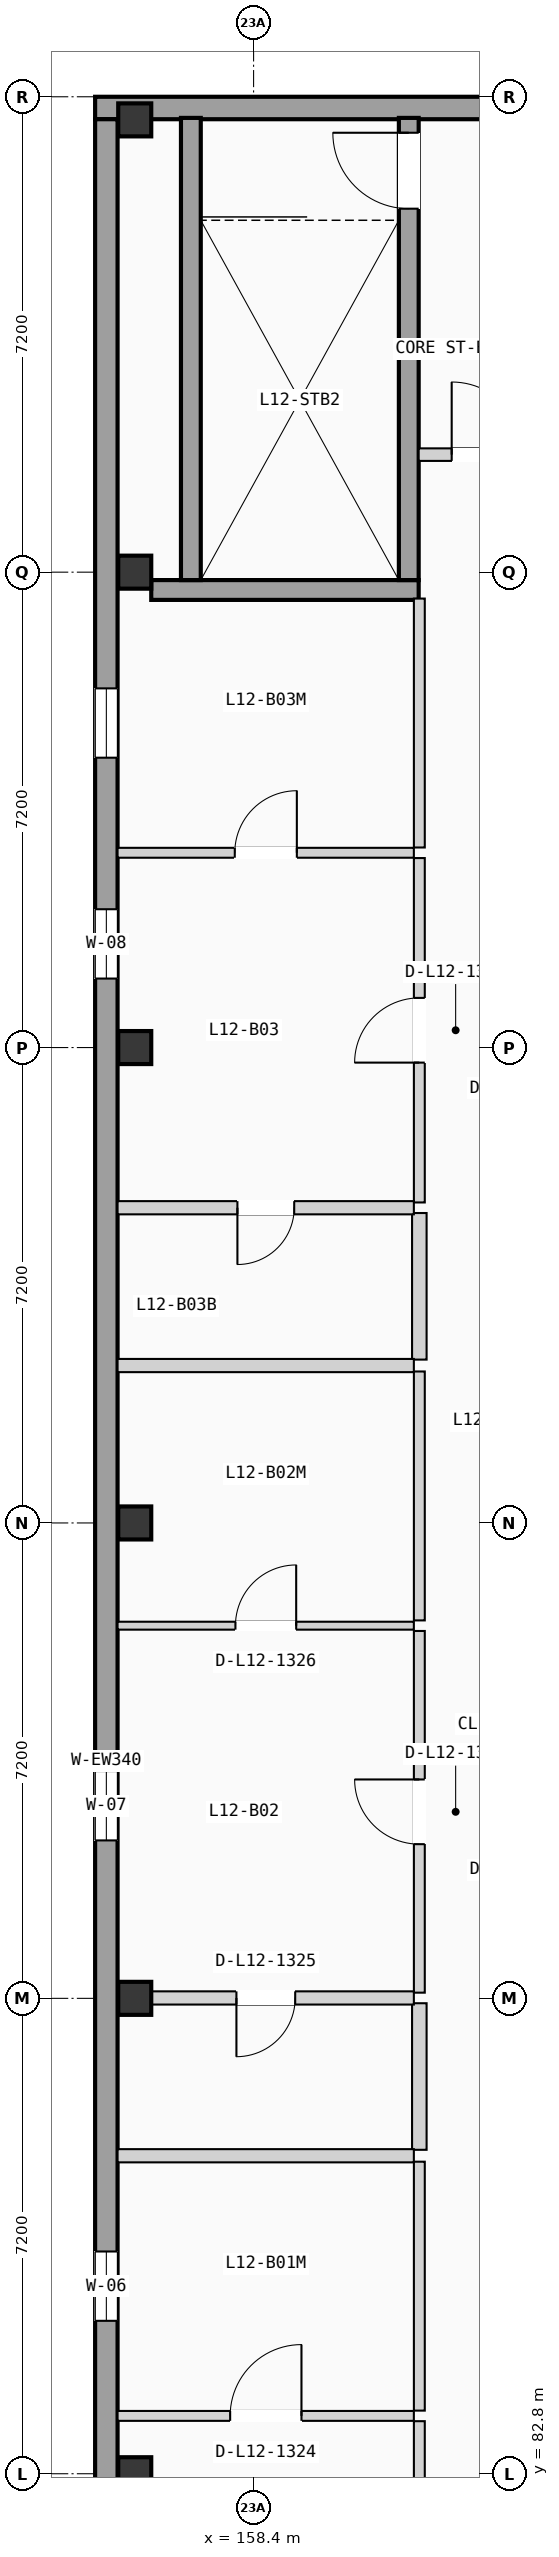
"""IFC4 building model, lengths in metres.
Left out: names, types, materials, properties, quantities, classifications, styles, units other than length and angle.
Written with IfcOpenShell. Run it as: python <this file> out.ifc"""

import sys

from ifc_helpers import new_model, si_unit, direction, frame, frame_2d, origin, origin_2d, place, context, subcontext, project, spatial, rectangle, extrude, element, fill, save


model = new_model("IFC4")
c1 = context("Model", 3, precision=1e-05, world=origin(), true_north=direction((0.0, 1.0)))
c2 = subcontext(c1, "Body", "Model", "MODEL_VIEW")
j1 = project(units=[si_unit("LENGTHUNIT", "METRE"), si_unit("PLANEANGLEUNIT", "RADIAN")], contexts=[c1])
p1 = place(None, origin())
s1 = spatial("IfcSite", under=j1, at=p1, CompositionType="ELEMENT")
p2 = place(p1, origin())
s2 = spatial("IfcBuilding", under=s1, at=p2, CompositionType="ELEMENT")
p3 = place(p2, frame((0.0, 0.0, 40.425)))
s3 = spatial("IfcBuildingStorey", under=s2, at=p3, CompositionType="ELEMENT", Elevation=40.425)
for number, where, z_axis, x_axis in (
    (1, (156.6, 82.8, 0.0), (0.0, 0.0, 1.0), (1.0, 0.0, 0.0)),
    (2, (156.6, 90.0, 0.0), (0.0, 0.0, 1.0), (1.0, 0.0, 0.0)),
    (3, (156.6, 97.2, 0.0), (0.0, 0.0, 1.0), (1.0, 0.0, 0.0)),
    (4, (156.6, 104.4, 0.0), (0.0, 0.0, 1.0), (1.0, 0.0, 0.0)),
    (5, (156.6, 111.6, 0.0), (0.0, 0.0, 1.0), (1.0, 0.0, 0.0)),
    (6, (156.6, 118.45, 0.0), (0.0, 0.0, 1.0), (1.0, 0.0, 0.0)),
):
    element("IfcColumn", number, at=place(p3, frame(where, z_axis=z_axis, x_axis=x_axis)), inside=s3, PredefinedType="COLUMN", context=c2, shape_type="SweptSolid", body=[
        extrude(rectangle(XDim=0.5, YDim=0.5, at=origin_2d()), origin(), (0.0, 0.0, 1.0), 2.85),
    ])
p4 = place(p3, frame((156.0, 118.63, 0.0), z_axis=(0.0, 0.0, 1.0), x_axis=(1.0, 0.0, 0.0)))
e7 = element("IfcWall", 7, at=p4, inside=s3, PredefinedType="SOLIDWALL", context=c2, shape_type="SweptSolid", body=[
    extrude(rectangle(XDim=12.0, YDim=0.34, at=frame_2d((6.0, 0.0))), origin(), (0.0, 0.0, 1.0), 2.55),
])
p5 = place(p3, frame((156.17, 68.74, 0.0), z_axis=(0.0, 0.0, 1.0), x_axis=(0.0, 1.0, 0.0)))
e8 = element("IfcWall", 8, at=p5, inside=s3, PredefinedType="SOLIDWALL", context=c2, shape_type="SweptSolid", body=[
    extrude(rectangle(XDim=49.72, YDim=0.34, at=frame_2d((24.86, 0.0))), origin(), (0.0, 0.0, 1.0), 2.55),
])
p6 = place(p5, frame((11.24, 0.0, 0.85)))
e9 = element("IfcOpeningElement", 9, at=p6, cuts=e8, PredefinedType="OPENING", context=c2, shape_type="SweptSolid", body=[
    extrude(rectangle(XDim=0.95, YDim=1.2, at=frame_2d((0.475, 0.6))), frame((0.0, 0.18, 0.0), z_axis=(0.0, -1.0, 0.0), x_axis=(1.0, 0.0, 0.0)), (0.0, 0.0, 1.0), 0.36),
])
p7 = place(p5, frame((16.376, 0.0, 0.75)))
e10 = element("IfcOpeningElement", 10, at=p7, cuts=e8, PredefinedType="OPENING", context=c2, shape_type="SweptSolid", body=[
    extrude(rectangle(XDim=1.05, YDim=1.2, at=frame_2d((0.525, 0.6))), frame((0.0, 0.18, 0.0), z_axis=(0.0, -1.0, 0.0), x_axis=(1.0, 0.0, 0.0)), (0.0, 0.0, 1.0), 0.36),
])
p8 = place(p5, frame((23.652, 0.0, 0.75)))
e11 = element("IfcOpeningElement", 11, at=p8, cuts=e8, PredefinedType="OPENING", context=c2, shape_type="SweptSolid", body=[
    extrude(rectangle(XDim=1.05, YDim=1.35, at=frame_2d((0.525, 0.675))), frame((0.0, 0.18, 0.0), z_axis=(0.0, -1.0, 0.0), x_axis=(1.0, 0.0, 0.0)), (0.0, 0.0, 1.0), 0.36),
])
p9 = place(p5, frame((36.705, 0.0, 0.665)))
e12 = element("IfcOpeningElement", 12, at=p9, cuts=e8, PredefinedType="OPENING", context=c2, shape_type="SweptSolid", body=[
    extrude(rectangle(XDim=1.05, YDim=1.5, at=frame_2d((0.525, 0.75))), frame((0.0, 0.18, 0.0), z_axis=(0.0, -1.0, 0.0), x_axis=(1.0, 0.0, 0.0)), (0.0, 0.0, 1.0), 0.36),
])
p10 = place(p5, frame((40.05, 0.0, 0.515)))
e13 = element("IfcOpeningElement", 13, at=p10, cuts=e8, PredefinedType="OPENING", context=c2, shape_type="SweptSolid", body=[
    extrude(rectangle(XDim=1.05, YDim=1.65, at=frame_2d((0.525, 0.825))), frame((0.0, 0.18, 0.0), z_axis=(0.0, -1.0, 0.0), x_axis=(1.0, 0.0, 0.0)), (0.0, 0.0, 1.0), 0.36),
])
p11 = place(p3, frame((156.85, 111.33, 0.0), z_axis=(0.0, 0.0, 1.0), x_axis=(1.0, 0.0, 0.0)))
e14 = element("IfcWall", 14, at=p11, inside=s3, PredefinedType="SHEAR", context=c2, shape_type="SweptSolid", body=[
    extrude(rectangle(XDim=4.05, YDim=0.3, at=frame_2d((2.025, 0.0))), origin(), (0.0, 0.0, 1.0), 2.55),
])
p12 = place(p3, frame((157.45, 111.48, 0.0), z_axis=(0.0, 0.0, 1.0), x_axis=(0.0, 1.0, 0.0)))
e15 = element("IfcWall", 15, at=p12, inside=s3, PredefinedType="SHEAR", context=c2, shape_type="SweptSolid", body=[
    extrude(rectangle(XDim=7.0, YDim=0.3, at=frame_2d((3.5, 0.0))), origin(), (0.0, 0.0, 1.0), 2.55),
])
p13 = place(p3, frame((160.75, 111.48, 0.0), z_axis=(0.0, 0.0, 1.0), x_axis=(0.0, 1.0, 0.0)))
e16 = element("IfcWall", 16, at=p13, inside=s3, PredefinedType="SHEAR", context=c2, shape_type="SweptSolid", body=[
    extrude(rectangle(XDim=7.0, YDim=0.3, at=frame_2d((3.5, 0.0))), origin(), (0.0, 0.0, 1.0), 2.55),
])
p14 = place(p13, frame((5.625, 0.0, 0.0)))
e17 = element("IfcOpeningElement", 17, at=p14, cuts=e16, PredefinedType="OPENING", context=c2, shape_type="SweptSolid", body=[
    extrude(rectangle(XDim=1.15, YDim=2.12, at=frame_2d((0.575, 1.06))), frame((0.0, 0.16, 0.0), z_axis=(0.0, -1.0, 0.0), x_axis=(1.0, 0.0, 0.0)), (0.0, 0.0, 1.0), 0.32),
])
p15 = place(p3, frame((160.9, 113.38, 0.0), z_axis=(0.0, 0.0, 1.0), x_axis=(1.0, 0.0, 0.0)))
e18 = element("IfcWall", 18, at=p15, inside=s3, PredefinedType="PARTITIONING", context=c2, shape_type="SweptSolid", body=[
    extrude(rectangle(XDim=2.0, YDim=0.19, at=frame_2d((1.0, 0.0))), origin(), (0.0, 0.0, 1.0), 2.39),
])
p16 = place(p15, frame((0.5, 0.0, 0.0)))
e19 = element("IfcOpeningElement", 19, at=p16, cuts=e18, PredefinedType="OPENING", context=c2, shape_type="SweptSolid", body=[
    extrude(rectangle(XDim=1.1, YDim=2.12, at=frame_2d((0.55, 1.06))), frame((0.0, 0.105, 0.0), z_axis=(0.0, -1.0, 0.0), x_axis=(1.0, 0.0, 0.0)), (0.0, 0.0, 1.0), 0.21),
])
p17 = place(p3, frame((160.91, 78.38, 0.0), z_axis=(0.0, 0.0, 1.0), x_axis=(0.0, 1.0, 0.0)))
e20 = element("IfcWall", 20, at=p17, inside=s3, PredefinedType="PARTITIONING", context=c2, shape_type="SweptSolid", body=[
    extrude(rectangle(XDim=5.216, YDim=0.165, at=frame_2d((2.608, 0.0))), origin(), (0.0, 0.0, 1.0), 2.39),
])
p18 = place(p17, frame((2.118, 0.0, 0.0)))
e21 = element("IfcOpeningElement", 21, at=p18, cuts=e20, PredefinedType="OPENING", context=c2, shape_type="SweptSolid", body=[
    extrude(rectangle(XDim=0.98, YDim=2.08, at=frame_2d((0.49, 1.04))), frame((0.0, 0.093, 0.0), z_axis=(0.0, -1.0, 0.0), x_axis=(1.0, 0.0, 0.0)), (0.0, 0.0, 1.0), 0.185),
])
p19 = place(p3, frame((160.91, 83.756, 0.0), z_axis=(0.0, 0.0, 1.0), x_axis=(0.0, 1.0, 0.0)))
e22 = element("IfcWall", 22, at=p19, inside=s3, PredefinedType="PARTITIONING", context=c2, shape_type="SweptSolid", body=[
    extrude(rectangle(XDim=3.77, YDim=0.165, at=frame_2d((1.885, 0.0))), origin(), (0.0, 0.0, 1.0), 2.39),
])
p20 = place(p3, frame((160.91, 87.706, 0.0), z_axis=(0.0, 0.0, 1.0), x_axis=(0.0, 1.0, 0.0)))
e23 = element("IfcWall", 23, at=p20, inside=s3, PredefinedType="PLUMBINGWALL", context=c2, shape_type="SweptSolid", body=[
    extrude(rectangle(XDim=2.22, YDim=0.22, at=frame_2d((1.11, 0.0))), origin(), (0.0, 0.0, 1.0), 2.39),
])
p21 = place(p3, frame((160.91, 90.086, 0.0), z_axis=(0.0, 0.0, 1.0), x_axis=(0.0, 1.0, 0.0)))
e24 = element("IfcWall", 24, at=p21, inside=s3, PredefinedType="PARTITIONING", context=c2, shape_type="SweptSolid", body=[
    extrude(rectangle(XDim=5.478, YDim=0.165, at=frame_2d((2.739, 0.0))), origin(), (0.0, 0.0, 1.0), 2.39),
])
p22 = place(p21, frame((2.249, 0.0, 0.0)))
e25 = element("IfcOpeningElement", 25, at=p22, cuts=e24, PredefinedType="OPENING", context=c2, shape_type="SweptSolid", body=[
    extrude(rectangle(XDim=0.98, YDim=2.08, at=frame_2d((0.49, 1.04))), frame((0.0, 0.093, 0.0), z_axis=(0.0, -1.0, 0.0), x_axis=(1.0, 0.0, 0.0)), (0.0, 0.0, 1.0), 0.185),
])
p23 = place(p3, frame((160.91, 95.724, 0.0), z_axis=(0.0, 0.0, 1.0), x_axis=(0.0, 1.0, 0.0)))
e26 = element("IfcWall", 26, at=p23, inside=s3, PredefinedType="PARTITIONING", context=c2, shape_type="SweptSolid", body=[
    extrude(rectangle(XDim=3.77, YDim=0.165, at=frame_2d((1.885, 0.0))), origin(), (0.0, 0.0, 1.0), 2.39),
])
p24 = place(p3, frame((160.91, 99.674, 0.0), z_axis=(0.0, 0.0, 1.0), x_axis=(0.0, 1.0, 0.0)))
e27 = element("IfcWall", 27, at=p24, inside=s3, PredefinedType="PLUMBINGWALL", context=c2, shape_type="SweptSolid", body=[
    extrude(rectangle(XDim=2.22, YDim=0.22, at=frame_2d((1.11, 0.0))), origin(), (0.0, 0.0, 1.0), 2.39),
])
p25 = place(p3, frame((160.91, 102.054, 0.0), z_axis=(0.0, 0.0, 1.0), x_axis=(0.0, 1.0, 0.0)))
e28 = element("IfcWall", 28, at=p25, inside=s3, PredefinedType="PARTITIONING", context=c2, shape_type="SweptSolid", body=[
    extrude(rectangle(XDim=5.216, YDim=0.165, at=frame_2d((2.608, 0.0))), origin(), (0.0, 0.0, 1.0), 2.39),
])
p26 = place(p25, frame((2.118, 0.0, 0.0)))
e29 = element("IfcOpeningElement", 29, at=p26, cuts=e28, PredefinedType="OPENING", context=c2, shape_type="SweptSolid", body=[
    extrude(rectangle(XDim=0.98, YDim=2.08, at=frame_2d((0.49, 1.04))), frame((0.0, 0.093, 0.0), z_axis=(0.0, -1.0, 0.0), x_axis=(1.0, 0.0, 0.0)), (0.0, 0.0, 1.0), 0.185),
])
p27 = place(p3, frame((160.91, 107.43, 0.0), z_axis=(0.0, 0.0, 1.0), x_axis=(0.0, 1.0, 0.0)))
e30 = element("IfcWall", 30, at=p27, inside=s3, PredefinedType="PARTITIONING", context=c2, shape_type="SweptSolid", body=[
    extrude(rectangle(XDim=3.77, YDim=0.165, at=frame_2d((1.885, 0.0))), origin(), (0.0, 0.0, 1.0), 2.39),
])
p28 = place(p3, frame((156.34, 83.676, 0.0), z_axis=(0.0, 0.0, 1.0), x_axis=(1.0, 0.0, 0.0)))
e31 = element("IfcWall", 31, at=p28, inside=s3, PredefinedType="PARTITIONING", context=c2, shape_type="SweptSolid", body=[
    extrude(rectangle(XDim=4.487, YDim=0.15, at=frame_2d((2.243, 0.0))), origin(), (0.0, 0.0, 1.0), 2.39),
])
p29 = place(p28, frame((1.705, 0.0, 0.0)))
e32 = element("IfcOpeningElement", 32, at=p29, cuts=e31, PredefinedType="OPENING", context=c2, shape_type="SweptSolid", body=[
    extrude(rectangle(XDim=1.08, YDim=2.1, at=frame_2d((0.54, 1.05))), frame((0.0, 0.085, 0.0), z_axis=(0.0, -1.0, 0.0), x_axis=(1.0, 0.0, 0.0)), (0.0, 0.0, 1.0), 0.17),
])
p30 = place(p3, frame((156.34, 87.616, 0.0), z_axis=(0.0, 0.0, 1.0), x_axis=(1.0, 0.0, 0.0)))
e33 = element("IfcWall", 33, at=p30, inside=s3, PredefinedType="PLUMBINGWALL", context=c2, shape_type="SweptSolid", body=[
    extrude(rectangle(XDim=4.487, YDim=0.2, at=frame_2d((2.243, 0.0))), origin(), (0.0, 0.0, 1.0), 2.39),
])
p31 = place(p3, frame((156.34, 90.006, 0.0), z_axis=(0.0, 0.0, 1.0), x_axis=(1.0, 0.0, 0.0)))
e34 = element("IfcWall", 34, at=p31, inside=s3, PredefinedType="PLUMBINGWALL", context=c2, shape_type="SweptSolid", body=[
    extrude(rectangle(XDim=4.487, YDim=0.2, at=frame_2d((2.243, 0.0))), origin(), (0.0, 0.0, 1.0), 2.12),
])
p32 = place(p31, frame((1.8, 0.0, 0.0)))
e35 = element("IfcOpeningElement", 35, at=p32, cuts=e34, PredefinedType="OPENING", context=c2, shape_type="SweptSolid", body=[
    extrude(rectangle(XDim=0.89, YDim=2.03, at=frame_2d((0.445, 1.015))), frame((0.0, 0.11, 0.0), z_axis=(0.0, -1.0, 0.0), x_axis=(1.0, 0.0, 0.0)), (0.0, 0.0, 1.0), 0.22),
])
p33 = place(p3, frame((156.34, 95.644, 0.0), z_axis=(0.0, 0.0, 1.0), x_axis=(1.0, 0.0, 0.0)))
e36 = element("IfcWall", 36, at=p33, inside=s3, PredefinedType="PARTITIONING", context=c2, shape_type="SweptSolid", body=[
    extrude(rectangle(XDim=4.487, YDim=0.12, at=frame_2d((2.243, 0.0))), origin(), (0.0, 0.0, 1.0), 2.39),
])
p34 = place(p33, frame((1.785, 0.0, 0.0)))
e37 = element("IfcOpeningElement", 37, at=p34, cuts=e36, PredefinedType="OPENING", context=c2, shape_type="SweptSolid", body=[
    extrude(rectangle(XDim=0.92, YDim=2.02, at=frame_2d((0.46, 1.01))), frame((0.0, 0.07, 0.0), z_axis=(0.0, -1.0, 0.0), x_axis=(1.0, 0.0, 0.0)), (0.0, 0.0, 1.0), 0.14),
])
p35 = place(p3, frame((156.34, 99.584, 0.0), z_axis=(0.0, 0.0, 1.0), x_axis=(1.0, 0.0, 0.0)))
e38 = element("IfcWall", 38, at=p35, inside=s3, PredefinedType="PLUMBINGWALL", context=c2, shape_type="SweptSolid", body=[
    extrude(rectangle(XDim=4.487, YDim=0.2, at=frame_2d((2.243, 0.0))), origin(), (0.0, 0.0, 1.0), 2.39),
])
p36 = place(p3, frame((156.34, 101.974, 0.0), z_axis=(0.0, 0.0, 1.0), x_axis=(1.0, 0.0, 0.0)))
e39 = element("IfcWall", 39, at=p36, inside=s3, PredefinedType="PLUMBINGWALL", context=c2, shape_type="SweptSolid", body=[
    extrude(rectangle(XDim=4.487, YDim=0.2, at=frame_2d((2.243, 0.0))), origin(), (0.0, 0.0, 1.0), 2.39),
])
p37 = place(p36, frame((1.815, 0.0, 0.0)))
e40 = element("IfcOpeningElement", 40, at=p37, cuts=e39, PredefinedType="OPENING", context=c2, shape_type="SweptSolid", body=[
    extrude(rectangle(XDim=0.86, YDim=2.0, at=frame_2d((0.43, 1.0))), frame((0.0, 0.11, 0.0), z_axis=(0.0, -1.0, 0.0), x_axis=(1.0, 0.0, 0.0)), (0.0, 0.0, 1.0), 0.22),
])
p38 = place(p3, frame((156.34, 107.35, 0.0), z_axis=(0.0, 0.0, 1.0), x_axis=(1.0, 0.0, 0.0)))
e41 = element("IfcWall", 41, at=p38, inside=s3, PredefinedType="PARTITIONING", context=c2, shape_type="SweptSolid", body=[
    extrude(rectangle(XDim=4.487, YDim=0.15, at=frame_2d((2.243, 0.0))), origin(), (0.0, 0.0, 1.0), 2.39),
])
p39 = place(p38, frame((1.775, 0.0, 0.0)))
e42 = element("IfcOpeningElement", 42, at=p39, cuts=e41, PredefinedType="OPENING", context=c2, shape_type="SweptSolid", body=[
    extrude(rectangle(XDim=0.94, YDim=2.06, at=frame_2d((0.47, 1.03))), frame((0.0, 0.085, 0.0), z_axis=(0.0, -1.0, 0.0), x_axis=(1.0, 0.0, 0.0)), (0.0, 0.0, 1.0), 0.17),
])
p40 = place(p7, origin())
e43 = element("IfcWindow", 43, at=p40, inside=s3, PartitioningType="SINGLE_PANEL", PredefinedType="WINDOW", context=c2, shape_type="SweptSolid", body=[
    extrude(rectangle(XDim=1.05, YDim=1.2, at=frame_2d((0.525, 0.6))), frame((0.0, 0.03, 0.0), z_axis=(0.0, -1.0, 0.0), x_axis=(1.0, 0.0, 0.0)), (0.0, 0.0, 1.0), 0.06),
])
fill(e10, e43)
p41 = place(p8, origin())
e44 = element("IfcWindow", 44, at=p41, inside=s3, PartitioningType="SINGLE_PANEL", PredefinedType="WINDOW", context=c2, shape_type="SweptSolid", body=[
    extrude(rectangle(XDim=1.05, YDim=1.35, at=frame_2d((0.525, 0.675))), frame((0.0, 0.03, 0.0), z_axis=(0.0, -1.0, 0.0), x_axis=(1.0, 0.0, 0.0)), (0.0, 0.0, 1.0), 0.06),
])
fill(e11, e44)
p42 = place(p9, origin())
e45 = element("IfcWindow", 45, at=p42, inside=s3, PartitioningType="SINGLE_PANEL", PredefinedType="WINDOW", context=c2, shape_type="SweptSolid", body=[
    extrude(rectangle(XDim=1.05, YDim=1.5, at=frame_2d((0.525, 0.75))), frame((0.0, 0.03, 0.0), z_axis=(0.0, -1.0, 0.0), x_axis=(1.0, 0.0, 0.0)), (0.0, 0.0, 1.0), 0.06),
])
fill(e12, e45)
p43 = place(p10, origin())
e46 = element("IfcWindow", 46, at=p43, inside=s3, PartitioningType="SINGLE_PANEL", PredefinedType="WINDOW", context=c2, shape_type="SweptSolid", body=[
    extrude(rectangle(XDim=1.05, YDim=1.65, at=frame_2d((0.525, 0.825))), frame((0.0, 0.03, 0.0), z_axis=(0.0, -1.0, 0.0), x_axis=(1.0, 0.0, 0.0)), (0.0, 0.0, 1.0), 0.06),
])
fill(e13, e46)
p44 = place(p14, origin())
e47 = element("IfcDoor", 47, at=p44, inside=s3, OperationType="SINGLE_SWING_RIGHT", PredefinedType="DOOR", context=c2, shape_type="SweptSolid", body=[
    extrude(rectangle(XDim=1.15, YDim=2.12, at=frame_2d((0.575, 1.06))), frame((0.0, 0.025, 0.0), z_axis=(0.0, -1.0, 0.0), x_axis=(1.0, 0.0, 0.0)), (0.0, 0.0, 1.0), 0.05),
])
fill(e17, e47)
p45 = place(p16, origin())
e48 = element("IfcDoor", 48, at=p45, inside=s3, OperationType="SINGLE_SWING_LEFT", PredefinedType="DOOR", context=c2, shape_type="SweptSolid", body=[
    extrude(rectangle(XDim=1.1, YDim=2.12, at=frame_2d((0.55, 1.06))), frame((0.0, 0.025, 0.0), z_axis=(0.0, -1.0, 0.0), x_axis=(1.0, 0.0, 0.0)), (0.0, 0.0, 1.0), 0.05),
])
fill(e19, e48)
p46 = place(p22, origin())
e49 = element("IfcDoor", 49, at=p46, inside=s3, OperationType="SINGLE_SWING_RIGHT", PredefinedType="DOOR", context=c2, shape_type="SweptSolid", body=[
    extrude(rectangle(XDim=0.98, YDim=2.08, at=frame_2d((0.49, 1.04))), frame((0.0, 0.025, 0.0), z_axis=(0.0, -1.0, 0.0), x_axis=(1.0, 0.0, 0.0)), (0.0, 0.0, 1.0), 0.05),
])
fill(e25, e49)
p47 = place(p26, origin())
e50 = element("IfcDoor", 50, at=p47, inside=s3, OperationType="SINGLE_SWING_LEFT", PredefinedType="DOOR", context=c2, shape_type="SweptSolid", body=[
    extrude(rectangle(XDim=0.98, YDim=2.08, at=frame_2d((0.49, 1.04))), frame((0.0, 0.025, 0.0), z_axis=(0.0, -1.0, 0.0), x_axis=(1.0, 0.0, 0.0)), (0.0, 0.0, 1.0), 0.05),
])
fill(e29, e50)
p48 = place(p29, origin())
e51 = element("IfcDoor", 51, at=p48, inside=s3, OperationType="SINGLE_SWING_RIGHT", PredefinedType="DOOR", context=c2, shape_type="SweptSolid", body=[
    extrude(rectangle(XDim=1.08, YDim=2.1, at=frame_2d((0.54, 1.05))), frame((0.0, 0.025, 0.0), z_axis=(0.0, -1.0, 0.0), x_axis=(1.0, 0.0, 0.0)), (0.0, 0.0, 1.0), 0.05),
])
fill(e32, e51)
p49 = place(p32, frame((0.89, 0.0, 0.0), z_axis=(0.0, 0.0, 1.0), x_axis=(-1.0, 0.0, 0.0)))
e52 = element("IfcDoor", 52, at=p49, inside=s3, OperationType="SINGLE_SWING_LEFT", PredefinedType="DOOR", context=c2, shape_type="SweptSolid", body=[
    extrude(rectangle(XDim=0.89, YDim=2.03, at=frame_2d((0.445, 1.015))), frame((0.0, 0.025, 0.0), z_axis=(0.0, -1.0, 0.0), x_axis=(1.0, 0.0, 0.0)), (0.0, 0.0, 1.0), 0.05),
])
fill(e35, e52)
p50 = place(p34, origin())
e53 = element("IfcDoor", 53, at=p50, inside=s3, OperationType="SINGLE_SWING_RIGHT", PredefinedType="DOOR", context=c2, shape_type="SweptSolid", body=[
    extrude(rectangle(XDim=0.92, YDim=2.02, at=frame_2d((0.46, 1.01))), frame((0.0, 0.025, 0.0), z_axis=(0.0, -1.0, 0.0), x_axis=(1.0, 0.0, 0.0)), (0.0, 0.0, 1.0), 0.05),
])
fill(e37, e53)
p51 = place(p37, frame((0.86, 0.0, 0.0), z_axis=(0.0, 0.0, 1.0), x_axis=(-1.0, 0.0, 0.0)))
e54 = element("IfcDoor", 54, at=p51, inside=s3, OperationType="SINGLE_SWING_LEFT", PredefinedType="DOOR", context=c2, shape_type="SweptSolid", body=[
    extrude(rectangle(XDim=0.86, YDim=2.0, at=frame_2d((0.43, 1.0))), frame((0.0, 0.025, 0.0), z_axis=(0.0, -1.0, 0.0), x_axis=(1.0, 0.0, 0.0)), (0.0, 0.0, 1.0), 0.05),
])
fill(e40, e54)
p52 = place(p39, origin())
e55 = element("IfcDoor", 55, at=p52, inside=s3, OperationType="SINGLE_SWING_RIGHT", PredefinedType="DOOR", context=c2, shape_type="SweptSolid", body=[
    extrude(rectangle(XDim=0.94, YDim=2.06, at=frame_2d((0.47, 1.03))), frame((0.0, 0.025, 0.0), z_axis=(0.0, -1.0, 0.0), x_axis=(1.0, 0.0, 0.0)), (0.0, 0.0, 1.0), 0.05),
])
fill(e42, e55)
save(model, sys.argv[1])
